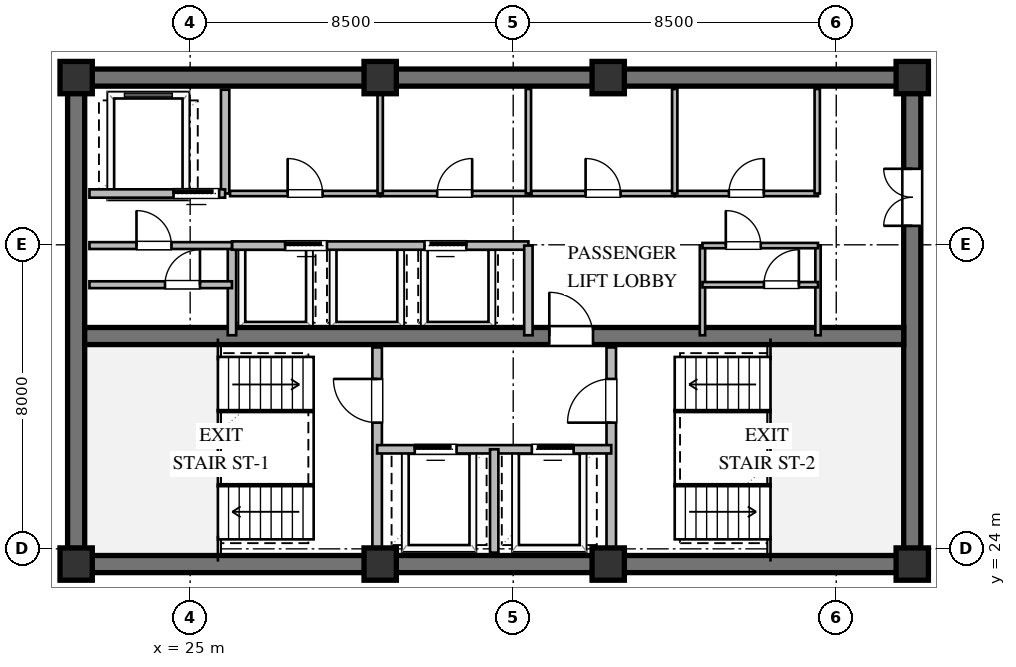
"""IFC4 building model, lengths in metres.
Left out: names, types, materials, properties, quantities, classifications, styles, units other than length and angle.
Written with IfcOpenShell. Run it as: python <this file> out.ifc"""

import sys

from ifc_helpers import new_model, si_unit, direction, frame, frame_2d, origin, origin_2d, place, context, subcontext, project, spatial, rectangle, extrude, element, fill, save


model = new_model("IFC4")
c1 = context("Model", 3, precision=1e-05, world=origin(), true_north=direction((0.0, 1.0)))
c2 = subcontext(c1, "Body", "Model", "MODEL_VIEW")
j1 = project(units=[si_unit("LENGTHUNIT", "METRE"), si_unit("PLANEANGLEUNIT", "RADIAN")], contexts=[c1])
p1 = place(None, origin())
s1 = spatial("IfcSite", under=j1, at=p1, CompositionType="ELEMENT")
p2 = place(p1, origin())
s2 = spatial("IfcBuilding", under=s1, at=p2, CompositionType="ELEMENT")
p3 = place(p2, frame((0.0, 0.0, 220.8)))
s3 = spatial("IfcBuildingStorey", under=s2, at=p3, CompositionType="ELEMENT", Elevation=220.8)
for number, where, z_axis, x_axis in (
    (1, (21.775, 23.6, 0.0), (0.0, 0.0, 1.0), (1.0, 0.0, 0.0)),
    (2, (21.775, 36.4, 0.0), (0.0, 0.0, 1.0), (1.0, 0.0, 0.0)),
):
    element("IfcWall", number, at=place(p3, frame(where, z_axis=z_axis, x_axis=x_axis)), inside=s3, PredefinedType="SHEAR", context=c2, shape_type="SweptSolid", body=[
        extrude(rectangle(XDim=22.45, YDim=0.45, at=frame_2d((11.225, 0.0))), origin(), (0.0, 0.0, 1.0), 3.36),
    ])
p4 = place(p3, frame((22.0, 23.825, 0.0), z_axis=(0.0, 0.0, 1.0), x_axis=(0.0, 1.0, 0.0)))
e3 = element("IfcWall", 3, at=p4, inside=s3, PredefinedType="SHEAR", context=c2, shape_type="SweptSolid", body=[
    extrude(rectangle(XDim=12.35, YDim=0.45, at=frame_2d((6.175, 0.0))), origin(), (0.0, 0.0, 1.0), 3.36),
])
p5 = place(p3, frame((44.0, 23.825, 0.0), z_axis=(0.0, 0.0, 1.0), x_axis=(0.0, 1.0, 0.0)))
e4 = element("IfcWall", 4, at=p5, inside=s3, PredefinedType="SHEAR", context=c2, shape_type="SweptSolid", body=[
    extrude(rectangle(XDim=12.35, YDim=0.45, at=frame_2d((6.175, 0.0))), origin(), (0.0, 0.0, 1.0), 3.36),
])
p6 = place(p5, frame((8.675, 0.0, 0.0)))
e5 = element("IfcOpeningElement", 5, at=p6, cuts=e4, PredefinedType="OPENING", context=c2, shape_type="SweptSolid", body=[
    extrude(rectangle(XDim=1.5, YDim=2.15, at=frame_2d((0.75, 1.075))), frame((0.0, 0.235, 0.0), z_axis=(0.0, -1.0, 0.0), x_axis=(1.0, 0.0, 0.0)), (0.0, 0.0, 1.0), 0.47),
])
p7 = place(p3, frame((22.225, 29.6, 0.0), z_axis=(0.0, 0.0, 1.0), x_axis=(1.0, 0.0, 0.0)))
e6 = element("IfcWall", 6, at=p7, inside=s3, PredefinedType="SHEAR", context=c2, shape_type="SweptSolid", body=[
    extrude(rectangle(XDim=21.55, YDim=0.45, at=frame_2d((10.775, 0.0))), origin(), (0.0, 0.0, 1.0), 3.36),
])
p8 = place(p7, frame((12.225, 0.0, 0.0)))
e7 = element("IfcOpeningElement", 7, at=p8, cuts=e6, PredefinedType="OPENING", context=c2, shape_type="SweptSolid", body=[
    extrude(rectangle(XDim=1.15, YDim=2.1, at=frame_2d((0.575, 1.05))), frame((0.0, 0.235, 0.0), z_axis=(0.0, -1.0, 0.0), x_axis=(1.0, 0.0, 0.0)), (0.0, 0.0, 1.0), 0.47),
])
for number, where, z_axis, x_axis in (
    (8, (22.0, 23.6, 0.0), (0.0, 0.0, 1.0), (1.0, 0.0, 0.0)),
    (9, (30.0, 23.6, 0.0), (0.0, 0.0, 1.0), (1.0, 0.0, 0.0)),
    (10, (36.0, 23.6, 0.0), (0.0, 0.0, 1.0), (1.0, 0.0, 0.0)),
    (11, (44.0, 23.6, 0.0), (0.0, 0.0, 1.0), (1.0, 0.0, 0.0)),
    (12, (44.0, 36.4, 0.0), (0.0, 0.0, 1.0), (1.0, 0.0, 0.0)),
    (13, (36.0, 36.4, 0.0), (0.0, 0.0, 1.0), (1.0, 0.0, 0.0)),
    (14, (30.0, 36.4, 0.0), (0.0, 0.0, 1.0), (1.0, 0.0, 0.0)),
    (15, (22.0, 36.4, 0.0), (0.0, 0.0, 1.0), (1.0, 0.0, 0.0)),
):
    element("IfcColumn", number, at=place(p3, frame(where, z_axis=z_axis, x_axis=x_axis)), inside=s3, PredefinedType="COLUMN", context=c2, shape_type="SweptSolid", body=[
        extrude(rectangle(XDim=0.85, YDim=0.85, at=origin_2d()), origin(), (0.0, 0.0, 1.0), 3.6),
    ])
p9 = place(p3, frame((29.92, 23.9, 0.0), z_axis=(0.0, 0.0, 1.0), x_axis=(0.0, 1.0, 0.0)))
e16 = element("IfcWall", 16, at=p9, inside=s3, PredefinedType="SOLIDWALL", context=c2, shape_type="SweptSolid", body=[
    extrude(rectangle(XDim=5.4, YDim=0.25, at=frame_2d((2.7, 0.0))), origin(), (0.0, 0.0, 1.0), 3.36),
])
p10 = place(p9, frame((3.421, 0.0, 0.0)))
e17 = element("IfcOpeningElement", 17, at=p10, cuts=e16, PredefinedType="OPENING", context=c2, shape_type="SweptSolid", body=[
    extrude(rectangle(XDim=1.15, YDim=2.1, at=frame_2d((0.575, 1.05))), frame((0.0, 0.135, 0.0), z_axis=(0.0, -1.0, 0.0), x_axis=(1.0, 0.0, 0.0)), (0.0, 0.0, 1.0), 0.27),
])
p11 = place(p3, frame((36.08, 23.9, 0.0), z_axis=(0.0, 0.0, 1.0), x_axis=(0.0, 1.0, 0.0)))
e18 = element("IfcWall", 18, at=p11, inside=s3, PredefinedType="SOLIDWALL", context=c2, shape_type="SweptSolid", body=[
    extrude(rectangle(XDim=5.4, YDim=0.25, at=frame_2d((2.7, 0.0))), origin(), (0.0, 0.0, 1.0), 3.36),
])
p12 = place(p11, frame((3.421, 0.0, 0.0)))
e19 = element("IfcOpeningElement", 19, at=p12, cuts=e18, PredefinedType="OPENING", context=c2, shape_type="SweptSolid", body=[
    extrude(rectangle(XDim=1.15, YDim=2.1, at=frame_2d((0.575, 1.05))), frame((0.0, 0.135, 0.0), z_axis=(0.0, -1.0, 0.0), x_axis=(1.0, 0.0, 0.0)), (0.0, 0.0, 1.0), 0.27),
])
p13 = place(p3, frame((29.92, 26.62, 0.0), z_axis=(0.0, 0.0, 1.0), x_axis=(1.0, 0.0, 0.0)))
e20 = element("IfcWall", 20, at=p13, inside=s3, PredefinedType="SOLIDWALL", context=c2, shape_type="SweptSolid", body=[
    extrude(rectangle(XDim=6.16, YDim=0.22, at=frame_2d((3.08, 0.0))), origin(), (0.0, 0.0, 1.0), 3.36),
])
p14 = place(p13, frame((0.99, 0.0, 0.0)))
e21 = element("IfcOpeningElement", 21, at=p14, cuts=e20, PredefinedType="OPENING", context=c2, shape_type="SweptSolid", body=[
    extrude(rectangle(XDim=1.1, YDim=2.1, at=frame_2d((0.55, 1.05))), frame((0.0, 0.12, 0.0), z_axis=(0.0, -1.0, 0.0), x_axis=(1.0, 0.0, 0.0)), (0.0, 0.0, 1.0), 0.24),
])
p15 = place(p13, frame((4.07, 0.0, 0.0)))
e22 = element("IfcOpeningElement", 22, at=p15, cuts=e20, PredefinedType="OPENING", context=c2, shape_type="SweptSolid", body=[
    extrude(rectangle(XDim=1.1, YDim=2.1, at=frame_2d((0.55, 1.05))), frame((0.0, 0.12, 0.0), z_axis=(0.0, -1.0, 0.0), x_axis=(1.0, 0.0, 0.0)), (0.0, 0.0, 1.0), 0.24),
])
p16 = place(p3, frame((33.0, 23.9, 0.0), z_axis=(0.0, 0.0, 1.0), x_axis=(0.0, 1.0, 0.0)))
e23 = element("IfcWall", 23, at=p16, inside=s3, PredefinedType="SOLIDWALL", context=c2, shape_type="SweptSolid", body=[
    extrude(rectangle(XDim=2.72, YDim=0.22, at=frame_2d((1.36, 0.0))), origin(), (0.0, 0.0, 1.0), 3.36),
])
p17 = place(p3, frame((25.92, 33.35, 0.0), z_axis=(0.0, 0.0, 1.0), x_axis=(0.0, 1.0, 0.0)))
e24 = element("IfcWall", 24, at=p17, inside=s3, PredefinedType="SOLIDWALL", context=c2, shape_type="SweptSolid", body=[
    extrude(rectangle(XDim=2.73, YDim=0.22, at=frame_2d((1.365, 0.0))), origin(), (0.0, 0.0, 1.0), 3.36),
])
p18 = place(p3, frame((22.35, 33.35, 0.0), z_axis=(0.0, 0.0, 1.0), x_axis=(1.0, 0.0, 0.0)))
e25 = element("IfcWall", 25, at=p18, inside=s3, PredefinedType="SOLIDWALL", context=c2, shape_type="SweptSolid", body=[
    extrude(rectangle(XDim=3.57, YDim=0.22, at=frame_2d((1.785, 0.0))), origin(), (0.0, 0.0, 1.0), 3.36),
])
p19 = place(p18, frame((2.213, 0.0, 0.0)))
e26 = element("IfcOpeningElement", 26, at=p19, cuts=e25, PredefinedType="OPENING", context=c2, shape_type="SweptSolid", body=[
    extrude(rectangle(XDim=1.2, YDim=2.1, at=frame_2d((0.6, 1.05))), frame((0.0, 0.12, 0.0), z_axis=(0.0, -1.0, 0.0), x_axis=(1.0, 0.0, 0.0)), (0.0, 0.0, 1.0), 0.24),
])
p20 = place(p3, frame((26.1, 29.62, 0.0), z_axis=(0.0, 0.0, 1.0), x_axis=(0.0, 1.0, 0.0)))
e27 = element("IfcWall", 27, at=p20, inside=s3, PredefinedType="SOLIDWALL", context=c2, shape_type="SweptSolid", body=[
    extrude(rectangle(XDim=2.36, YDim=0.22, at=frame_2d((1.18, 0.0))), origin(), (0.0, 0.0, 1.0), 3.36),
])
p21 = place(p3, frame((26.1, 31.98, 0.0), z_axis=(0.0, 0.0, 1.0), x_axis=(1.0, 0.0, 0.0)))
e28 = element("IfcWall", 28, at=p21, inside=s3, PredefinedType="SOLIDWALL", context=c2, shape_type="SweptSolid", body=[
    extrude(rectangle(XDim=7.8, YDim=0.22, at=frame_2d((3.9, 0.0))), origin(), (0.0, 0.0, 1.0), 3.36),
])
p22 = place(p21, frame((1.4, 0.0, 0.0)))
e29 = element("IfcOpeningElement", 29, at=p22, cuts=e28, PredefinedType="OPENING", context=c2, shape_type="SweptSolid", body=[
    extrude(rectangle(XDim=1.1, YDim=2.1, at=frame_2d((0.55, 1.05))), frame((0.0, 0.12, 0.0), z_axis=(0.0, -1.0, 0.0), x_axis=(1.0, 0.0, 0.0)), (0.0, 0.0, 1.0), 0.24),
])
p23 = place(p21, frame((5.066, 0.0, 0.0)))
e30 = element("IfcOpeningElement", 30, at=p23, cuts=e28, PredefinedType="OPENING", context=c2, shape_type="SweptSolid", body=[
    extrude(rectangle(XDim=1.1, YDim=2.1, at=frame_2d((0.55, 1.05))), frame((0.0, 0.12, 0.0), z_axis=(0.0, -1.0, 0.0), x_axis=(1.0, 0.0, 0.0)), (0.0, 0.0, 1.0), 0.24),
])
p24 = place(p3, frame((33.9, 29.62, 0.0), z_axis=(0.0, 0.0, 1.0), x_axis=(0.0, 1.0, 0.0)))
e31 = element("IfcWall", 31, at=p24, inside=s3, PredefinedType="SOLIDWALL", context=c2, shape_type="SweptSolid", body=[
    extrude(rectangle(XDim=2.36, YDim=0.22, at=frame_2d((1.18, 0.0))), origin(), (0.0, 0.0, 1.0), 3.36),
])
p25 = place(p3, frame((26.05, 33.35, 0.0), z_axis=(0.0, 0.0, 1.0), x_axis=(1.0, 0.0, 0.0)))
e32 = element("IfcWall", 32, at=p25, inside=s3, PredefinedType="PARTITIONING", context=c2, shape_type="SweptSolid", body=[
    extrude(rectangle(XDim=3.95, YDim=0.14, at=frame_2d((1.975, 0.0))), origin(), (0.0, 0.0, 1.0), 3.36),
])
p26 = place(p25, frame((1.515, 0.0, 0.0)))
e33 = element("IfcOpeningElement", 33, at=p26, cuts=e32, PredefinedType="OPENING", context=c2, shape_type="SweptSolid", body=[
    extrude(rectangle(XDim=0.92, YDim=2.1, at=frame_2d((0.46, 1.05))), frame((0.0, 0.08, 0.0), z_axis=(0.0, -1.0, 0.0), x_axis=(1.0, 0.0, 0.0)), (0.0, 0.0, 1.0), 0.16),
])
p27 = place(p3, frame((30.0, 33.35, 0.0), z_axis=(0.0, 0.0, 1.0), x_axis=(1.0, 0.0, 0.0)))
e34 = element("IfcWall", 34, at=p27, inside=s3, PredefinedType="PARTITIONING", context=c2, shape_type="SweptSolid", body=[
    extrude(rectangle(XDim=3.92, YDim=0.14, at=frame_2d((1.96, 0.0))), origin(), (0.0, 0.0, 1.0), 3.36),
])
p28 = place(p27, frame((1.5, 0.0, 0.0)))
e35 = element("IfcOpeningElement", 35, at=p28, cuts=e34, PredefinedType="OPENING", context=c2, shape_type="SweptSolid", body=[
    extrude(rectangle(XDim=0.92, YDim=2.1, at=frame_2d((0.46, 1.05))), frame((0.0, 0.08, 0.0), z_axis=(0.0, -1.0, 0.0), x_axis=(1.0, 0.0, 0.0)), (0.0, 0.0, 1.0), 0.16),
])
for number, where, z_axis, x_axis in (
    (36, (30.0, 33.35, 0.0), (0.0, 0.0, 1.0), (0.0, 1.0, 0.0)),
    (37, (33.9, 33.35, 0.0), (0.0, 0.0, 1.0), (0.0, 1.0, 0.0)),
):
    element("IfcWall", number, at=place(p3, frame(where, z_axis=z_axis, x_axis=x_axis)), inside=s3, PredefinedType="PARTITIONING", context=c2, shape_type="SweptSolid", body=[
        extrude(rectangle(XDim=2.75, YDim=0.14, at=frame_2d((1.375, 0.0))), origin(), (0.0, 0.0, 1.0), 3.36),
    ])
p29 = place(p3, frame((33.98, 33.35, 0.0), z_axis=(0.0, 0.0, 1.0), x_axis=(1.0, 0.0, 0.0)))
e38 = element("IfcWall", 38, at=p29, inside=s3, PredefinedType="PARTITIONING", context=c2, shape_type="SweptSolid", body=[
    extrude(rectangle(XDim=3.77, YDim=0.14, at=frame_2d((1.885, 0.0))), origin(), (0.0, 0.0, 1.0), 3.36),
])
p30 = place(p29, frame((1.425, 0.0, 0.0)))
e39 = element("IfcOpeningElement", 39, at=p30, cuts=e38, PredefinedType="OPENING", context=c2, shape_type="SweptSolid", body=[
    extrude(rectangle(XDim=0.92, YDim=2.1, at=frame_2d((0.46, 1.05))), frame((0.0, 0.08, 0.0), z_axis=(0.0, -1.0, 0.0), x_axis=(1.0, 0.0, 0.0)), (0.0, 0.0, 1.0), 0.16),
])
p31 = place(p3, frame((37.75, 33.35, 0.0), z_axis=(0.0, 0.0, 1.0), x_axis=(1.0, 0.0, 0.0)))
e40 = element("IfcWall", 40, at=p31, inside=s3, PredefinedType="PARTITIONING", context=c2, shape_type="SweptSolid", body=[
    extrude(rectangle(XDim=3.77, YDim=0.14, at=frame_2d((1.885, 0.0))), origin(), (0.0, 0.0, 1.0), 3.36),
])
p32 = place(p31, frame((1.425, 0.0, 0.0)))
e41 = element("IfcOpeningElement", 41, at=p32, cuts=e40, PredefinedType="OPENING", context=c2, shape_type="SweptSolid", body=[
    extrude(rectangle(XDim=0.92, YDim=2.1, at=frame_2d((0.46, 1.05))), frame((0.0, 0.08, 0.0), z_axis=(0.0, -1.0, 0.0), x_axis=(1.0, 0.0, 0.0)), (0.0, 0.0, 1.0), 0.16),
])
for number, where, z_axis, x_axis in (
    (42, (37.75, 33.35, 0.0), (0.0, 0.0, 1.0), (0.0, 1.0, 0.0)),
    (43, (41.5, 33.35, 0.0), (0.0, 0.0, 1.0), (0.0, 1.0, 0.0)),
):
    element("IfcWall", number, at=place(p3, frame(where, z_axis=z_axis, x_axis=x_axis)), inside=s3, PredefinedType="PARTITIONING", context=c2, shape_type="SweptSolid", body=[
        extrude(rectangle(XDim=2.75, YDim=0.14, at=frame_2d((1.375, 0.0))), origin(), (0.0, 0.0, 1.0), 3.36),
    ])
p33 = place(p3, frame((22.35, 30.95, 0.0), z_axis=(0.0, 0.0, 1.0), x_axis=(1.0, 0.0, 0.0)))
e44 = element("IfcWall", 44, at=p33, inside=s3, PredefinedType="PARTITIONING", context=c2, shape_type="SweptSolid", body=[
    extrude(rectangle(XDim=3.75, YDim=0.18, at=frame_2d((1.875, 0.0))), origin(), (0.0, 0.0, 1.0), 3.36),
])
p34 = place(p33, frame((1.988, 0.0, 0.0)))
e45 = element("IfcOpeningElement", 45, at=p34, cuts=e44, PredefinedType="OPENING", context=c2, shape_type="SweptSolid", body=[
    extrude(rectangle(XDim=0.92, YDim=2.1, at=frame_2d((0.46, 1.05))), frame((0.0, 0.1, 0.0), z_axis=(0.0, -1.0, 0.0), x_axis=(1.0, 0.0, 0.0)), (0.0, 0.0, 1.0), 0.2),
])
p35 = place(p3, frame((22.35, 31.98, 0.0), z_axis=(0.0, 0.0, 1.0), x_axis=(1.0, 0.0, 0.0)))
e46 = element("IfcWall", 46, at=p35, inside=s3, PredefinedType="PARTITIONING", context=c2, shape_type="SweptSolid", body=[
    extrude(rectangle(XDim=3.75, YDim=0.18, at=frame_2d((1.875, 0.0))), origin(), (0.0, 0.0, 1.0), 3.36),
])
p36 = place(p35, frame((1.238, 0.0, 0.0)))
e47 = element("IfcOpeningElement", 47, at=p36, cuts=e46, PredefinedType="OPENING", context=c2, shape_type="SweptSolid", body=[
    extrude(rectangle(XDim=0.92, YDim=2.1, at=frame_2d((0.46, 1.05))), frame((0.0, 0.1, 0.0), z_axis=(0.0, -1.0, 0.0), x_axis=(1.0, 0.0, 0.0)), (0.0, 0.0, 1.0), 0.2),
])
for number, where, z_axis, x_axis in (
    (48, (38.48, 29.62, 0.0), (0.0, 0.0, 1.0), (0.0, 1.0, 0.0)),
    (49, (41.52, 29.62, 0.0), (0.0, 0.0, 1.0), (0.0, 1.0, 0.0)),
):
    element("IfcWall", number, at=place(p3, frame(where, z_axis=z_axis, x_axis=x_axis)), inside=s3, PredefinedType="PARTITIONING", context=c2, shape_type="SweptSolid", body=[
        extrude(rectangle(XDim=2.36, YDim=0.14, at=frame_2d((1.18, 0.0))), origin(), (0.0, 0.0, 1.0), 3.36),
    ])
p37 = place(p3, frame((38.48, 30.95, 0.0), z_axis=(0.0, 0.0, 1.0), x_axis=(1.0, 0.0, 0.0)))
e50 = element("IfcWall", 50, at=p37, inside=s3, PredefinedType="PARTITIONING", context=c2, shape_type="SweptSolid", body=[
    extrude(rectangle(XDim=3.04, YDim=0.14, at=frame_2d((1.52, 0.0))), origin(), (0.0, 0.0, 1.0), 3.36),
])
p38 = place(p37, frame((1.617, 0.0, 0.0)))
e51 = element("IfcOpeningElement", 51, at=p38, cuts=e50, PredefinedType="OPENING", context=c2, shape_type="SweptSolid", body=[
    extrude(rectangle(XDim=0.92, YDim=2.1, at=frame_2d((0.46, 1.05))), frame((0.0, 0.08, 0.0), z_axis=(0.0, -1.0, 0.0), x_axis=(1.0, 0.0, 0.0)), (0.0, 0.0, 1.0), 0.16),
])
p39 = place(p3, frame((38.48, 31.98, 0.0), z_axis=(0.0, 0.0, 1.0), x_axis=(1.0, 0.0, 0.0)))
e52 = element("IfcWall", 52, at=p39, inside=s3, PredefinedType="PARTITIONING", context=c2, shape_type="SweptSolid", body=[
    extrude(rectangle(XDim=3.04, YDim=0.14, at=frame_2d((1.52, 0.0))), origin(), (0.0, 0.0, 1.0), 3.36),
])
p40 = place(p39, frame((0.614, 0.0, 0.0)))
e53 = element("IfcOpeningElement", 53, at=p40, cuts=e52, PredefinedType="OPENING", context=c2, shape_type="SweptSolid", body=[
    extrude(rectangle(XDim=0.92, YDim=2.1, at=frame_2d((0.46, 1.05))), frame((0.0, 0.08, 0.0), z_axis=(0.0, -1.0, 0.0), x_axis=(1.0, 0.0, 0.0)), (0.0, 0.0, 1.0), 0.16),
])
p41 = place(p10, origin())
e54 = element("IfcDoor", 54, at=p41, inside=s3, OperationType="SINGLE_SWING_RIGHT", PredefinedType="DOOR", context=c2, shape_type="SweptSolid", body=[
    extrude(rectangle(XDim=1.15, YDim=2.1, at=frame_2d((0.575, 1.05))), frame((0.0, 0.025, 0.0), z_axis=(0.0, -1.0, 0.0), x_axis=(1.0, 0.0, 0.0)), (0.0, 0.0, 1.0), 0.05),
])
fill(e17, e54)
p42 = place(p12, origin())
e55 = element("IfcDoor", 55, at=p42, inside=s3, OperationType="SINGLE_SWING_LEFT", PredefinedType="DOOR", context=c2, shape_type="SweptSolid", body=[
    extrude(rectangle(XDim=1.15, YDim=2.1, at=frame_2d((0.575, 1.05))), frame((0.0, 0.025, 0.0), z_axis=(0.0, -1.0, 0.0), x_axis=(1.0, 0.0, 0.0)), (0.0, 0.0, 1.0), 0.05),
])
fill(e19, e55)
p43 = place(p14, origin())
e56 = element("IfcDoor", 56, at=p43, inside=s3, OperationType="SLIDING_TO_LEFT", PredefinedType="DOOR", context=c2, shape_type="SweptSolid", body=[
    extrude(rectangle(XDim=1.1, YDim=2.1, at=frame_2d((0.55, 1.05))), frame((0.0, 0.025, 0.0), z_axis=(0.0, -1.0, 0.0), x_axis=(1.0, 0.0, 0.0)), (0.0, 0.0, 1.0), 0.05),
])
fill(e21, e56)
p44 = place(p15, origin())
e57 = element("IfcDoor", 57, at=p44, inside=s3, OperationType="SLIDING_TO_RIGHT", PredefinedType="DOOR", context=c2, shape_type="SweptSolid", body=[
    extrude(rectangle(XDim=1.1, YDim=2.1, at=frame_2d((0.55, 1.05))), frame((0.0, 0.025, 0.0), z_axis=(0.0, -1.0, 0.0), x_axis=(1.0, 0.0, 0.0)), (0.0, 0.0, 1.0), 0.05),
])
fill(e22, e57)
p45 = place(p8, origin())
e58 = element("IfcDoor", 58, at=p45, inside=s3, OperationType="SINGLE_SWING_LEFT", PredefinedType="DOOR", context=c2, shape_type="SweptSolid", body=[
    extrude(rectangle(XDim=1.15, YDim=2.1, at=frame_2d((0.575, 1.05))), frame((0.0, 0.025, 0.0), z_axis=(0.0, -1.0, 0.0), x_axis=(1.0, 0.0, 0.0)), (0.0, 0.0, 1.0), 0.05),
])
fill(e7, e58)
p46 = place(p6, origin())
e59 = element("IfcDoor", 59, at=p46, inside=s3, OperationType="DOUBLE_DOOR_SINGLE_SWING", PredefinedType="DOOR", context=c2, shape_type="SweptSolid", body=[
    extrude(rectangle(XDim=1.5, YDim=2.15, at=frame_2d((0.75, 1.075))), frame((0.0, 0.025, 0.0), z_axis=(0.0, -1.0, 0.0), x_axis=(1.0, 0.0, 0.0)), (0.0, 0.0, 1.0), 0.05),
])
fill(e5, e59)
p47 = place(p19, origin())
e60 = element("IfcDoor", 60, at=p47, inside=s3, OperationType="SLIDING_TO_LEFT", PredefinedType="DOOR", context=c2, shape_type="SweptSolid", body=[
    extrude(rectangle(XDim=1.2, YDim=2.1, at=frame_2d((0.6, 1.05))), frame((0.0, 0.025, 0.0), z_axis=(0.0, -1.0, 0.0), x_axis=(1.0, 0.0, 0.0)), (0.0, 0.0, 1.0), 0.05),
])
fill(e26, e60)
p48 = place(p22, origin())
e61 = element("IfcDoor", 61, at=p48, inside=s3, OperationType="SLIDING_TO_LEFT", PredefinedType="DOOR", context=c2, shape_type="SweptSolid", body=[
    extrude(rectangle(XDim=1.1, YDim=2.1, at=frame_2d((0.55, 1.05))), frame((0.0, 0.025, 0.0), z_axis=(0.0, -1.0, 0.0), x_axis=(1.0, 0.0, 0.0)), (0.0, 0.0, 1.0), 0.05),
])
fill(e29, e61)
p49 = place(p23, origin())
e62 = element("IfcDoor", 62, at=p49, inside=s3, OperationType="SLIDING_TO_RIGHT", PredefinedType="DOOR", context=c2, shape_type="SweptSolid", body=[
    extrude(rectangle(XDim=1.1, YDim=2.1, at=frame_2d((0.55, 1.05))), frame((0.0, 0.025, 0.0), z_axis=(0.0, -1.0, 0.0), x_axis=(1.0, 0.0, 0.0)), (0.0, 0.0, 1.0), 0.05),
])
fill(e30, e62)
p50 = place(p26, origin())
e63 = element("IfcDoor", 63, at=p50, inside=s3, OperationType="SINGLE_SWING_LEFT", PredefinedType="DOOR", context=c2, shape_type="SweptSolid", body=[
    extrude(rectangle(XDim=0.92, YDim=2.1, at=frame_2d((0.46, 1.05))), frame((0.0, 0.025, 0.0), z_axis=(0.0, -1.0, 0.0), x_axis=(1.0, 0.0, 0.0)), (0.0, 0.0, 1.0), 0.05),
])
fill(e33, e63)
p51 = place(p28, origin())
e64 = element("IfcDoor", 64, at=p51, inside=s3, OperationType="SINGLE_SWING_RIGHT", PredefinedType="DOOR", context=c2, shape_type="SweptSolid", body=[
    extrude(rectangle(XDim=0.92, YDim=2.1, at=frame_2d((0.46, 1.05))), frame((0.0, 0.025, 0.0), z_axis=(0.0, -1.0, 0.0), x_axis=(1.0, 0.0, 0.0)), (0.0, 0.0, 1.0), 0.05),
])
fill(e35, e64)
p52 = place(p30, origin())
e65 = element("IfcDoor", 65, at=p52, inside=s3, OperationType="SINGLE_SWING_LEFT", PredefinedType="DOOR", context=c2, shape_type="SweptSolid", body=[
    extrude(rectangle(XDim=0.92, YDim=2.1, at=frame_2d((0.46, 1.05))), frame((0.0, 0.025, 0.0), z_axis=(0.0, -1.0, 0.0), x_axis=(1.0, 0.0, 0.0)), (0.0, 0.0, 1.0), 0.05),
])
fill(e39, e65)
p53 = place(p32, origin())
e66 = element("IfcDoor", 66, at=p53, inside=s3, OperationType="SINGLE_SWING_RIGHT", PredefinedType="DOOR", context=c2, shape_type="SweptSolid", body=[
    extrude(rectangle(XDim=0.92, YDim=2.1, at=frame_2d((0.46, 1.05))), frame((0.0, 0.025, 0.0), z_axis=(0.0, -1.0, 0.0), x_axis=(1.0, 0.0, 0.0)), (0.0, 0.0, 1.0), 0.05),
])
fill(e41, e66)
p54 = place(p36, origin())
e67 = element("IfcDoor", 67, at=p54, inside=s3, OperationType="SINGLE_SWING_LEFT", PredefinedType="DOOR", context=c2, shape_type="SweptSolid", body=[
    extrude(rectangle(XDim=0.92, YDim=2.1, at=frame_2d((0.46, 1.05))), frame((0.0, 0.025, 0.0), z_axis=(0.0, -1.0, 0.0), x_axis=(1.0, 0.0, 0.0)), (0.0, 0.0, 1.0), 0.05),
])
fill(e47, e67)
p55 = place(p34, origin())
e68 = element("IfcDoor", 68, at=p55, inside=s3, OperationType="SINGLE_SWING_RIGHT", PredefinedType="DOOR", context=c2, shape_type="SweptSolid", body=[
    extrude(rectangle(XDim=0.92, YDim=2.1, at=frame_2d((0.46, 1.05))), frame((0.0, 0.025, 0.0), z_axis=(0.0, -1.0, 0.0), x_axis=(1.0, 0.0, 0.0)), (0.0, 0.0, 1.0), 0.05),
])
fill(e45, e68)
p56 = place(p40, origin())
e69 = element("IfcDoor", 69, at=p56, inside=s3, OperationType="SINGLE_SWING_LEFT", PredefinedType="DOOR", context=c2, shape_type="SweptSolid", body=[
    extrude(rectangle(XDim=0.92, YDim=2.1, at=frame_2d((0.46, 1.05))), frame((0.0, 0.025, 0.0), z_axis=(0.0, -1.0, 0.0), x_axis=(1.0, 0.0, 0.0)), (0.0, 0.0, 1.0), 0.05),
])
fill(e53, e69)
p57 = place(p38, origin())
e70 = element("IfcDoor", 70, at=p57, inside=s3, OperationType="SINGLE_SWING_RIGHT", PredefinedType="DOOR", context=c2, shape_type="SweptSolid", body=[
    extrude(rectangle(XDim=0.92, YDim=2.1, at=frame_2d((0.46, 1.05))), frame((0.0, 0.025, 0.0), z_axis=(0.0, -1.0, 0.0), x_axis=(1.0, 0.0, 0.0)), (0.0, 0.0, 1.0), 0.05),
])
fill(e51, e70)
save(model, sys.argv[1])
